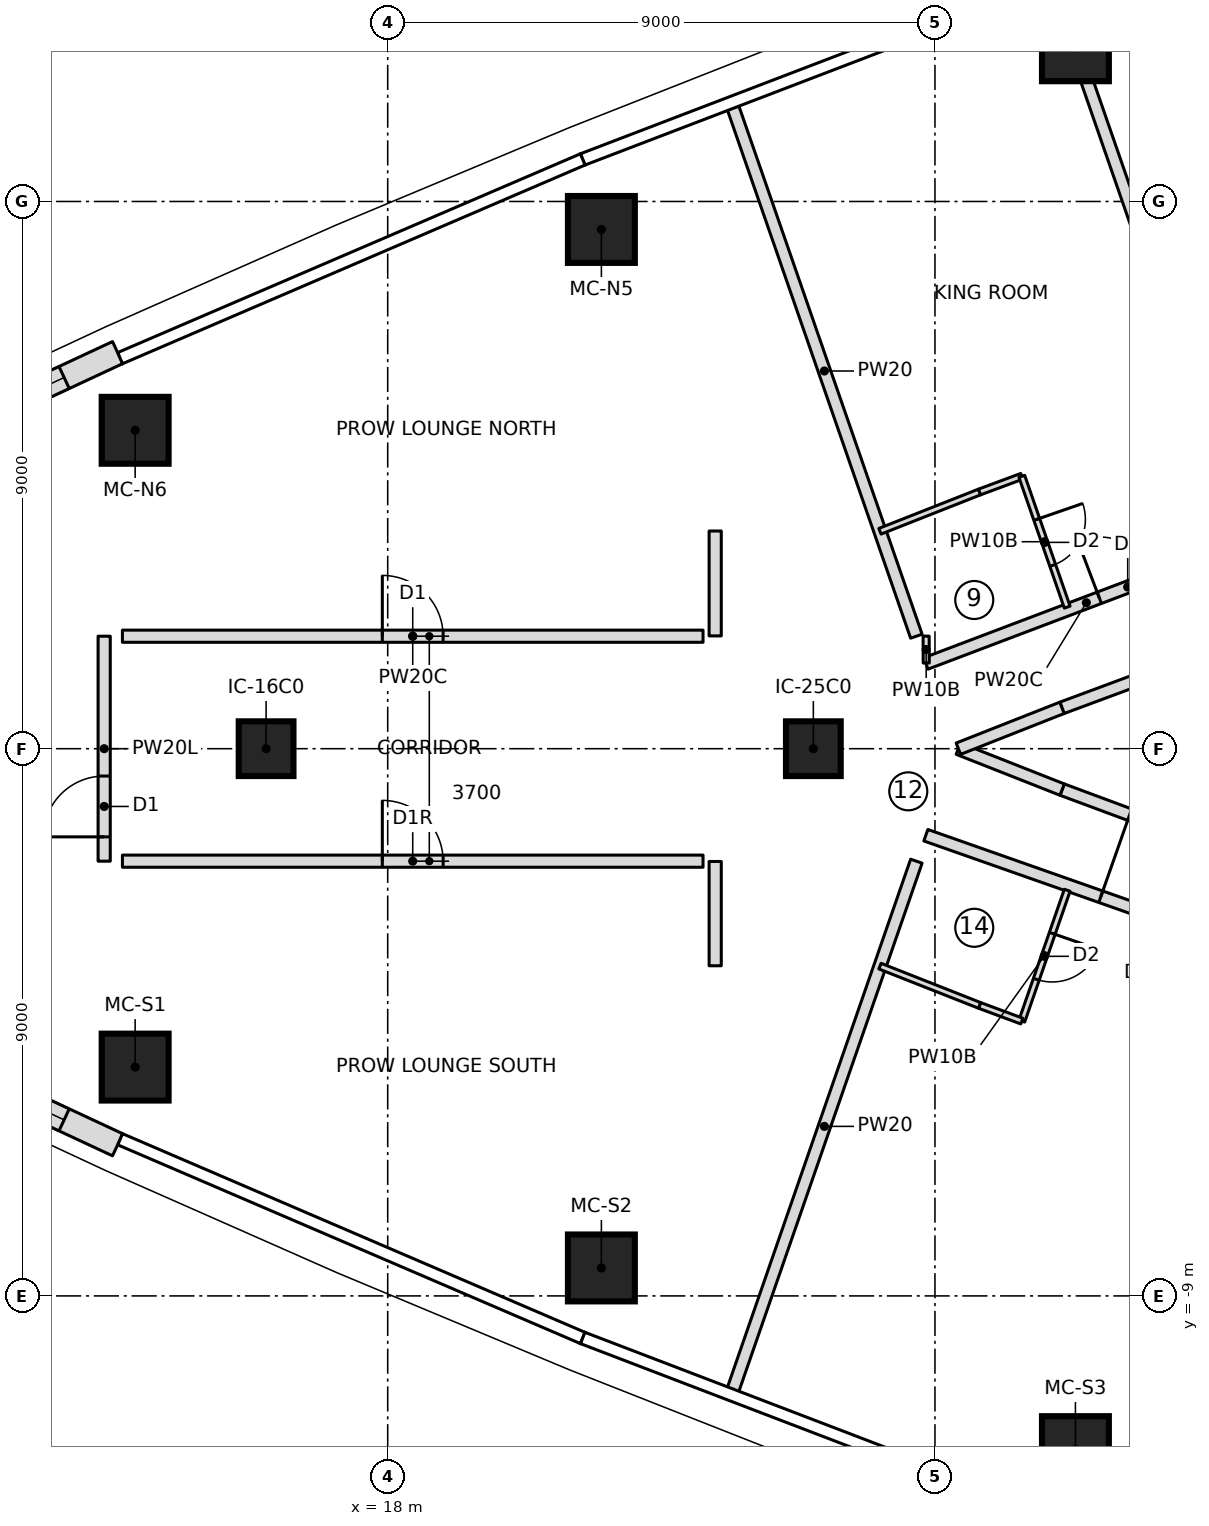
"""IFC4 building model, lengths in metres.
Left out: names, types, materials, properties, quantities, classifications, styles, units other than length and angle.
Written with IfcOpenShell. Run it as: python <this file> out.ifc"""

import sys

from ifc_helpers import new_model, si_unit, direction, frame, frame_2d, origin, origin_2d, place, context, subcontext, project, spatial, polyline, rectangle, outline, extrude, element, fill, save


model = new_model("IFC4")
c1 = context("Model", 3, precision=1e-05, world=origin(), true_north=direction((0.0, 1.0)))
c2 = subcontext(c1, "Body", "Model", "MODEL_VIEW")
j1 = project(units=[si_unit("LENGTHUNIT", "METRE"), si_unit("PLANEANGLEUNIT", "RADIAN")], contexts=[c1])
p1 = place(None, origin())
s1 = spatial("IfcSite", under=j1, at=p1, CompositionType="ELEMENT")
p2 = place(p1, origin())
s2 = spatial("IfcBuilding", under=s1, at=p2, CompositionType="ELEMENT")
p3 = place(p2, frame((0.0, 0.0, 296.3)))
s3 = spatial("IfcBuildingStorey", under=s2, at=p3, CompositionType="ELEMENT", Elevation=296.3)
for number, where, z_axis, x_axis in (
    (1, (13.846, -5.237, 0.0), (0.0, 0.0, 1.0), (1.0, 0.0, 0.0)),
    (2, (21.514, -8.54, 0.0), (0.0, 0.0, 1.0), (1.0, 0.0, 0.0)),
    (3, (29.31, -11.528, 0.0), (0.0, 0.0, 1.0), (1.0, 0.0, 0.0)),
    (4, (29.31, 11.528, 0.0), (0.0, 0.0, 1.0), (1.0, 0.0, 0.0)),
    (5, (21.514, 8.54, 0.0), (0.0, 0.0, 1.0), (1.0, 0.0, 0.0)),
    (6, (13.846, 5.237, 0.0), (0.0, 0.0, 1.0), (1.0, 0.0, 0.0)),
):
    element("IfcColumn", number, at=place(p3, frame(where, z_axis=z_axis, x_axis=x_axis)), inside=s3, PredefinedType="COLUMN", context=c2, shape_type="SweptSolid", body=[
        extrude(rectangle(XDim=1.1, YDim=1.1, at=origin_2d()), origin(), (0.0, 0.0, 1.0), 3.55),
    ])
for number, where, z_axis, x_axis in (
    (7, (16.0, 0.0, 0.0), (0.0, 0.0, 1.0), (1.0, 0.0, 0.0)),
    (8, (25.0, 0.0, 0.0), (0.0, 0.0, 1.0), (1.0, 0.0, 0.0)),
):
    element("IfcColumn", number, at=place(p3, frame(where, z_axis=z_axis, x_axis=x_axis)), inside=s3, PredefinedType="COLUMN", context=c2, shape_type="SweptSolid", body=[
        extrude(rectangle(XDim=0.9, YDim=0.9, at=origin_2d()), origin(), (0.0, 0.0, 1.0), 3.55),
    ])
p4 = place(p3, frame((13.559, 6.515, 0.0), z_axis=(0.0, 0.0, 1.0), x_axis=(-0.906485602396, -0.42223672584, 0.0)))
e9 = element("IfcWall", 9, at=p4, inside=s3, PredefinedType="NOTDEFINED", context=c2, shape_type="SweptSolid", body=[
    extrude(outline(polyline([(0.0, -0.2), (4.181, -0.2), (4.103, 0.2), (0.0, 0.2), (0.0, -0.2)])), origin(), (0.0, 0.0, 1.0), 3.25),
])
p5 = place(p4, frame((0.971, 0.0, 0.6)))
e10 = element("IfcOpeningElement", 10, at=p5, cuts=e9, PredefinedType="OPENING", context=c2, shape_type="SweptSolid", body=[
    extrude(outline(polyline([(0.0, 1.35), (0.084, 1.771), (0.322, 2.128), (0.679, 2.366), (1.1, 2.45), (1.521, 2.366), (1.878, 2.128), (2.116, 1.771), (2.2, 1.35), (2.2, 1.1), (2.116, 0.679), (1.878, 0.322), (1.521, 0.084), (1.1, 0.0), (0.679, 0.084), (0.322, 0.322), (0.084, 0.679), (0.0, 1.1), (0.0, 1.35)])), frame((0.0, 0.21, 0.0), z_axis=(0.0, -1.0, 0.0), x_axis=(1.0, 0.0, 0.0)), (0.0, 0.0, 1.0), 0.42),
])
p6 = place(p3, frame((9.804, -4.766, 0.0), z_axis=(0.0, 0.0, 1.0), x_axis=(0.906485602396, -0.42223672584, 0.0)))
e11 = element("IfcWall", 11, at=p6, inside=s3, PredefinedType="NOTDEFINED", context=c2, shape_type="SweptSolid", body=[
    extrude(outline(polyline([(-0.039, -0.2), (4.142, -0.2), (4.142, 0.2), (0.039, 0.2), (-0.039, -0.2)])), origin(), (0.0, 0.0, 1.0), 3.25),
])
p7 = place(p6, frame((0.971, 0.0, 0.6)))
e12 = element("IfcOpeningElement", 12, at=p7, cuts=e11, PredefinedType="OPENING", context=c2, shape_type="SweptSolid", body=[
    extrude(outline(polyline([(0.0, 1.35), (0.084, 1.771), (0.322, 2.128), (0.679, 2.366), (1.1, 2.45), (1.521, 2.366), (1.878, 2.128), (2.116, 1.771), (2.2, 1.35), (2.2, 1.1), (2.116, 0.679), (1.878, 0.322), (1.521, 0.084), (1.1, 0.0), (0.679, 0.084), (0.322, 0.322), (0.084, 0.679), (0.0, 1.1), (0.0, 1.35)])), frame((0.0, 0.21, 0.0), z_axis=(0.0, -1.0, 0.0), x_axis=(1.0, 0.0, 0.0)), (0.0, 0.0, 1.0), 0.42),
])
p8 = place(p3, frame((13.637, 1.85, 0.0), z_axis=(0.0, 0.0, 1.0), x_axis=(1.0, 0.0, 0.0)))
e13 = element("IfcWall", 13, at=p8, inside=s3, PredefinedType="PARTITIONING", context=c2, shape_type="SweptSolid", body=[
    extrude(rectangle(XDim=9.549, YDim=0.2, at=frame_2d((4.774, 0.0))), origin(), (0.0, 0.0, 1.0), 3.25),
])
p9 = place(p8, frame((4.274, 0.0, 0.0)))
e14 = element("IfcOpeningElement", 14, at=p9, cuts=e13, PredefinedType="OPENING", context=c2, shape_type="SweptSolid", body=[
    extrude(rectangle(XDim=1.0, YDim=2.1, at=frame_2d((0.5, 1.05))), frame((0.0, 0.11, 0.0), z_axis=(0.0, -1.0, 0.0), x_axis=(1.0, 0.0, 0.0)), (0.0, 0.0, 1.0), 0.22),
])
p10 = place(p3, frame((13.637, -1.85, 0.0), z_axis=(0.0, 0.0, 1.0), x_axis=(1.0, 0.0, 0.0)))
e15 = element("IfcWall", 15, at=p10, inside=s3, PredefinedType="PARTITIONING", context=c2, shape_type="SweptSolid", body=[
    extrude(rectangle(XDim=9.549, YDim=0.2, at=frame_2d((4.774, 0.0))), origin(), (0.0, 0.0, 1.0), 3.25),
])
p11 = place(p10, frame((4.274, 0.0, 0.0)))
e16 = element("IfcOpeningElement", 16, at=p11, cuts=e15, PredefinedType="OPENING", context=c2, shape_type="SweptSolid", body=[
    extrude(rectangle(XDim=1.0, YDim=2.1, at=frame_2d((0.5, 1.05))), frame((0.0, 0.11, 0.0), z_axis=(0.0, -1.0, 0.0), x_axis=(1.0, 0.0, 0.0)), (0.0, 0.0, 1.0), 0.22),
])
p12 = place(p3, frame((13.337, -1.85, 0.0), z_axis=(0.0, 0.0, 1.0), x_axis=(0.0, 1.0, 0.0)))
e17 = element("IfcWall", 17, at=p12, inside=s3, PredefinedType="PARTITIONING", context=c2, shape_type="SweptSolid", body=[
    extrude(rectangle(XDim=3.7, YDim=0.2, at=frame_2d((1.85, 0.0))), origin(), (0.0, 0.0, 1.0), 3.25),
])
p13 = place(p12, frame((0.4, 0.0, 0.0)))
e18 = element("IfcOpeningElement", 18, at=p13, cuts=e17, PredefinedType="OPENING", context=c2, shape_type="SweptSolid", body=[
    extrude(rectangle(XDim=1.0, YDim=2.1, at=frame_2d((0.5, 1.05))), frame((0.0, 0.11, 0.0), z_axis=(0.0, -1.0, 0.0), x_axis=(1.0, 0.0, 0.0)), (0.0, 0.0, 1.0), 0.22),
])
p14 = place(p3, frame((26.694, 1.85, 0.0), z_axis=(0.0, 0.0, 1.0), x_axis=(-0.327714422317, 0.944776829418, 0.0)))
e19 = element("IfcWall", 19, at=p14, inside=s3, PredefinedType="PARTITIONING", context=c2, shape_type="SweptSolid", body=[
    extrude(rectangle(XDim=9.233, YDim=0.2, at=frame_2d((4.617, 0.0))), origin(), (0.0, 0.0, 1.0), 3.25),
])
p15 = place(p3, frame((26.85, 1.401, 0.0), z_axis=(0.0, 0.0, 1.0), x_axis=(0.935181367748, 0.354169181912, 0.0)))
e20 = element("IfcWall", 20, at=p15, inside=s3, PredefinedType="PARTITIONING", context=c2, shape_type="SweptSolid", body=[
    extrude(rectangle(XDim=5.645, YDim=0.2, at=frame_2d((2.823, 0.0))), origin(), (0.0, 0.0, 1.0), 3.25),
])
p16 = place(p15, frame((3.05, 0.0, 0.0)))
e21 = element("IfcOpeningElement", 21, at=p16, cuts=e20, PredefinedType="OPENING", context=c2, shape_type="SweptSolid", body=[
    extrude(rectangle(XDim=1.0, YDim=2.1, at=frame_2d((0.5, 1.05))), frame((0.0, 0.11, 0.0), z_axis=(0.0, -1.0, 0.0), x_axis=(1.0, 0.0, 0.0)), (0.0, 0.0, 1.0), 0.22),
])
p17 = place(p3, frame((26.096, 3.576, 0.0), z_axis=(0.0, 0.0, 1.0), x_axis=(0.930254925629, 0.366913850028, 0.0)))
e22 = element("IfcWall", 22, at=p17, inside=s3, PredefinedType="PARTITIONING", context=c2, shape_type="SweptSolid", body=[
    extrude(rectangle(XDim=1.76, YDim=0.1, at=frame_2d((0.88, 0.0))), origin(), (0.0, 0.0, 1.0), 3.25),
])
p18 = place(p3, frame((27.733, 4.222, 0.0), z_axis=(0.0, 0.0, 1.0), x_axis=(0.937514267289, 0.347946833049, 0.0)))
e23 = element("IfcWall", 23, at=p18, inside=s3, PredefinedType="PARTITIONING", context=c2, shape_type="SweptSolid", body=[
    extrude(rectangle(XDim=0.742, YDim=0.1, at=frame_2d((0.371, 0.0))), origin(), (0.0, 0.0, 1.0), 3.25),
])
p19 = place(p3, frame((28.428, 4.48, 0.0), z_axis=(0.0, 0.0, 1.0), x_axis=(0.327718024288, -0.944775579996, 0.0)))
e24 = element("IfcWall", 24, at=p19, inside=s3, PredefinedType="PARTITIONING", context=c2, shape_type="SweptSolid", body=[
    extrude(rectangle(XDim=2.277, YDim=0.1, at=frame_2d((1.139, 0.0))), origin(), (0.0, 0.0, 1.0), 3.25),
])
p20 = place(p19, frame((0.75, 0.0, 0.0)))
e25 = element("IfcOpeningElement", 25, at=p20, cuts=e24, PredefinedType="OPENING", context=c2, shape_type="SweptSolid", body=[
    extrude(rectangle(XDim=0.8, YDim=2.1, at=frame_2d((0.4, 1.05))), frame((0.0, 0.06, 0.0), z_axis=(0.0, -1.0, 0.0), x_axis=(1.0, 0.0, 0.0)), (0.0, 0.0, 1.0), 0.12),
])
p21 = place(p3, frame((32.129, 3.401, 0.0), z_axis=(0.0, 0.0, 1.0), x_axis=(-0.327724115377, 0.944773467134, 0.0)))
e26 = element("IfcWall", 26, at=p21, inside=s3, PredefinedType="PARTITIONING", context=c2, shape_type="SweptSolid", body=[
    extrude(rectangle(XDim=9.702, YDim=0.2, at=frame_2d((4.851, 0.0))), origin(), (0.0, 0.0, 1.0), 3.25),
])
p22 = place(p3, frame((23.668, -10.573, 0.0), z_axis=(0.0, 0.0, 1.0), x_axis=(0.327714422317, 0.944776829418, 0.0)))
e27 = element("IfcWall", 27, at=p22, inside=s3, PredefinedType="PARTITIONING", context=c2, shape_type="SweptSolid", body=[
    extrude(rectangle(XDim=9.233, YDim=0.2, at=frame_2d((4.617, 0.0))), origin(), (0.0, 0.0, 1.0), 3.25),
])
p23 = place(p3, frame((26.85, -1.423, 0.0), z_axis=(0.0, 0.0, 1.0), x_axis=(0.943328585164, -0.331860182022, 0.0)))
e28 = element("IfcWall", 28, at=p23, inside=s3, PredefinedType="PARTITIONING", context=c2, shape_type="SweptSolid", body=[
    extrude(rectangle(XDim=13.984, YDim=0.2, at=frame_2d((6.992, 0.0))), origin(), (0.0, 0.0, 1.0), 3.25),
])
p24 = place(p23, frame((3.05, 0.0, 0.0)))
e29 = element("IfcOpeningElement", 29, at=p24, cuts=e28, PredefinedType="OPENING", context=c2, shape_type="SweptSolid", body=[
    extrude(rectangle(XDim=1.5, YDim=2.1, at=frame_2d((0.75, 1.05))), frame((0.0, 0.11, 0.0), z_axis=(0.0, -1.0, 0.0), x_axis=(1.0, 0.0, 0.0)), (0.0, 0.0, 1.0), 0.22),
])
p25 = place(p3, frame((29.175, -2.328, 0.0), z_axis=(0.0, 0.0, 1.0), x_axis=(-0.327718024288, -0.944775579996, 0.0)))
e30 = element("IfcWall", 30, at=p25, inside=s3, PredefinedType="PARTITIONING", context=c2, shape_type="SweptSolid", body=[
    extrude(rectangle(XDim=2.277, YDim=0.1, at=frame_2d((1.139, 0.0))), origin(), (0.0, 0.0, 1.0), 3.25),
])
p26 = place(p25, frame((0.75, 0.0, 0.0)))
e31 = element("IfcOpeningElement", 31, at=p26, cuts=e30, PredefinedType="OPENING", context=c2, shape_type="SweptSolid", body=[
    extrude(rectangle(XDim=0.8, YDim=2.1, at=frame_2d((0.4, 1.05))), frame((0.0, 0.06, 0.0), z_axis=(0.0, -1.0, 0.0), x_axis=(1.0, 0.0, 0.0)), (0.0, 0.0, 1.0), 0.12),
])
p27 = place(p3, frame((28.428, -4.48, 0.0), z_axis=(0.0, 0.0, 1.0), x_axis=(-0.937514267289, 0.347946833049, 0.0)))
e32 = element("IfcWall", 32, at=p27, inside=s3, PredefinedType="PARTITIONING", context=c2, shape_type="SweptSolid", body=[
    extrude(rectangle(XDim=0.742, YDim=0.1, at=frame_2d((0.371, 0.0))), origin(), (0.0, 0.0, 1.0), 3.25),
])
p28 = place(p3, frame((27.733, -4.222, 0.0), z_axis=(0.0, 0.0, 1.0), x_axis=(-0.930254925629, 0.366913850028, 0.0)))
e33 = element("IfcWall", 33, at=p28, inside=s3, PredefinedType="PARTITIONING", context=c2, shape_type="SweptSolid", body=[
    extrude(rectangle(XDim=1.76, YDim=0.1, at=frame_2d((0.88, 0.0))), origin(), (0.0, 0.0, 1.0), 3.25),
])
p29 = place(p3, frame((32.76, -2.035, 0.0), z_axis=(0.0, 0.0, 1.0), x_axis=(-0.937460178932, 0.348092534992, 0.0)))
e34 = element("IfcWall", 34, at=p29, inside=s3, PredefinedType="PARTITIONING", context=c2, shape_type="SweptSolid", body=[
    extrude(rectangle(XDim=3.913, YDim=0.2, at=frame_2d((1.957, 0.0))), origin(), (0.0, 0.0, 1.0), 3.25),
])
p30 = place(p29, frame((1.457, 0.0, 0.0)))
e35 = element("IfcOpeningElement", 35, at=p30, cuts=e34, PredefinedType="OPENING", context=c2, shape_type="SweptSolid", body=[
    extrude(rectangle(XDim=1.0, YDim=2.1, at=frame_2d((0.5, 1.05))), frame((0.0, 0.11, 0.0), z_axis=(0.0, -1.0, 0.0), x_axis=(1.0, 0.0, 0.0)), (0.0, 0.0, 1.0), 0.22),
])
for number, where, z_axis, x_axis in (
    (36, (29.092, -0.673, 0.0), (0.0, 0.0, 1.0), (-0.93, 0.367, 0.0)),
    (37, (27.385, 0.0, 0.0), (0.0, 0.0, 1.0), (0.93, 0.367, 0.0)),
):
    element("IfcWall", number, at=place(p3, frame(where, z_axis=z_axis, x_axis=x_axis)), inside=s3, PredefinedType="PARTITIONING", context=c2, shape_type="SweptSolid", body=[
        extrude(rectangle(XDim=1.834, YDim=0.2, at=frame_2d((0.917, 0.0))), origin(), (0.0, 0.0, 1.0), 3.25),
    ])
p31 = place(p3, frame((29.092, 0.673, 0.0), z_axis=(0.0, 0.0, 1.0), x_axis=(0.937460178932, 0.348092534992, 0.0)))
e38 = element("IfcWall", 38, at=p31, inside=s3, PredefinedType="PARTITIONING", context=c2, shape_type="SweptSolid", body=[
    extrude(rectangle(XDim=3.913, YDim=0.2, at=frame_2d((1.957, 0.0))), origin(), (0.0, 0.0, 1.0), 3.25),
])
p32 = place(p3, frame((26.856, 1.409, 0.0), z_axis=(0.0, 0.0, 1.0), x_axis=(-0.003863105832, 0.999992538179, 0.0)))
e39 = element("IfcWall", 39, at=p32, inside=s3, PredefinedType="PARTITIONING", context=c2, shape_type="SweptSolid", body=[
    extrude(rectangle(XDim=0.442, YDim=0.1, at=frame_2d((0.221, 0.0))), origin(), (0.0, 0.0, 1.0), 3.25),
])
p33 = place(p3, frame((23.386, 3.58, 0.0), z_axis=(0.0, 0.0, 1.0), x_axis=(0.0, -1.0, 0.0)))
e40 = element("IfcWall", 40, at=p33, inside=s3, PredefinedType="PARTITIONING", context=c2, shape_type="SweptSolid", body=[
    extrude(rectangle(XDim=1.725, YDim=0.2, at=frame_2d((0.863, 0.0))), origin(), (0.0, 0.0, 1.0), 3.25),
])
p34 = place(p3, frame((23.386, -1.855, 0.0), z_axis=(0.0, 0.0, 1.0), x_axis=(0.0, -1.0, 0.0)))
e41 = element("IfcWall", 41, at=p34, inside=s3, PredefinedType="PARTITIONING", context=c2, shape_type="SweptSolid", body=[
    extrude(rectangle(XDim=1.715, YDim=0.2, at=frame_2d((0.858, 0.0))), origin(), (0.0, 0.0, 1.0), 3.25),
])
p35 = place(p5, origin())
e42 = element("IfcWindow", 42, at=p35, inside=s3, PartitioningType="SINGLE_PANEL", PredefinedType="WINDOW", context=c2, shape_type="SweptSolid", body=[
    extrude(outline(polyline([(0.0, 1.35), (0.084, 1.771), (0.322, 2.128), (0.679, 2.366), (1.1, 2.45), (1.521, 2.366), (1.878, 2.128), (2.116, 1.771), (2.2, 1.35), (2.2, 1.1), (2.116, 0.679), (1.878, 0.322), (1.521, 0.084), (1.1, 0.0), (0.679, 0.084), (0.322, 0.322), (0.084, 0.679), (0.0, 1.1), (0.0, 1.35)])), frame((0.0, 0.17, 0.0), z_axis=(0.0, -1.0, 0.0), x_axis=(1.0, 0.0, 0.0)), (0.0, 0.0, 1.0), 0.06),
])
fill(e10, e42)
p36 = place(p7, origin())
e43 = element("IfcWindow", 43, at=p36, inside=s3, PartitioningType="SINGLE_PANEL", PredefinedType="WINDOW", context=c2, shape_type="SweptSolid", body=[
    extrude(outline(polyline([(0.0, 1.35), (0.084, 1.771), (0.322, 2.128), (0.679, 2.366), (1.1, 2.45), (1.521, 2.366), (1.878, 2.128), (2.116, 1.771), (2.2, 1.35), (2.2, 1.1), (2.116, 0.679), (1.878, 0.322), (1.521, 0.084), (1.1, 0.0), (0.679, 0.084), (0.322, 0.322), (0.084, 0.679), (0.0, 1.1), (0.0, 1.35)])), frame((0.0, 0.17, 0.0), z_axis=(0.0, -1.0, 0.0), x_axis=(1.0, 0.0, 0.0)), (0.0, 0.0, 1.0), 0.06),
])
fill(e12, e43)
p37 = place(p9, origin())
e44 = element("IfcDoor", 44, at=p37, inside=s3, OperationType="SINGLE_SWING_LEFT", PredefinedType="DOOR", context=c2, shape_type="SweptSolid", body=[
    extrude(rectangle(XDim=1.0, YDim=2.1, at=frame_2d((0.5, 1.05))), frame((0.0, 0.025, 0.0), z_axis=(0.0, -1.0, 0.0), x_axis=(1.0, 0.0, 0.0)), (0.0, 0.0, 1.0), 0.05),
])
fill(e14, e44)
p38 = place(p11, origin())
e45 = element("IfcDoor", 45, at=p38, inside=s3, OperationType="SINGLE_SWING_RIGHT", PredefinedType="DOOR", context=c2, shape_type="SweptSolid", body=[
    extrude(rectangle(XDim=1.0, YDim=2.1, at=frame_2d((0.5, 1.05))), frame((0.0, 0.025, 0.0), z_axis=(0.0, -1.0, 0.0), x_axis=(1.0, 0.0, 0.0)), (0.0, 0.0, 1.0), 0.05),
])
fill(e16, e45)
p39 = place(p13, origin())
e46 = element("IfcDoor", 46, at=p39, inside=s3, OperationType="SINGLE_SWING_LEFT", PredefinedType="DOOR", context=c2, shape_type="SweptSolid", body=[
    extrude(rectangle(XDim=1.0, YDim=2.1, at=frame_2d((0.5, 1.05))), frame((0.0, 0.025, 0.0), z_axis=(0.0, -1.0, 0.0), x_axis=(1.0, 0.0, 0.0)), (0.0, 0.0, 1.0), 0.05),
])
fill(e18, e46)
p40 = place(p20, origin())
e47 = element("IfcDoor", 47, at=p40, inside=s3, OperationType="SINGLE_SWING_LEFT", PredefinedType="DOOR", context=c2, shape_type="SweptSolid", body=[
    extrude(rectangle(XDim=0.8, YDim=2.1, at=frame_2d((0.4, 1.05))), frame((0.0, 0.025, 0.0), z_axis=(0.0, -1.0, 0.0), x_axis=(1.0, 0.0, 0.0)), (0.0, 0.0, 1.0), 0.05),
])
fill(e25, e47)
p41 = place(p16, origin())
e48 = element("IfcDoor", 48, at=p41, inside=s3, OperationType="SINGLE_SWING_LEFT", PredefinedType="DOOR", context=c2, shape_type="SweptSolid", body=[
    extrude(rectangle(XDim=1.0, YDim=2.1, at=frame_2d((0.5, 1.05))), frame((0.0, 0.025, 0.0), z_axis=(0.0, -1.0, 0.0), x_axis=(1.0, 0.0, 0.0)), (0.0, 0.0, 1.0), 0.05),
])
fill(e21, e48)
p42 = place(p26, origin())
e49 = element("IfcDoor", 49, at=p42, inside=s3, OperationType="SINGLE_SWING_LEFT", PredefinedType="DOOR", context=c2, shape_type="SweptSolid", body=[
    extrude(rectangle(XDim=0.8, YDim=2.1, at=frame_2d((0.4, 1.05))), frame((0.0, 0.025, 0.0), z_axis=(0.0, -1.0, 0.0), x_axis=(1.0, 0.0, 0.0)), (0.0, 0.0, 1.0), 0.05),
])
fill(e31, e49)
p43 = place(p24, origin())
e50 = element("IfcDoor", 50, at=p43, inside=s3, OperationType="DOUBLE_DOOR_SINGLE_SWING", PredefinedType="DOOR", context=c2, shape_type="SweptSolid", body=[
    extrude(rectangle(XDim=1.5, YDim=2.1, at=frame_2d((0.75, 1.05))), frame((0.0, 0.025, 0.0), z_axis=(0.0, -1.0, 0.0), x_axis=(1.0, 0.0, 0.0)), (0.0, 0.0, 1.0), 0.05),
])
fill(e29, e50)
save(model, sys.argv[1])
